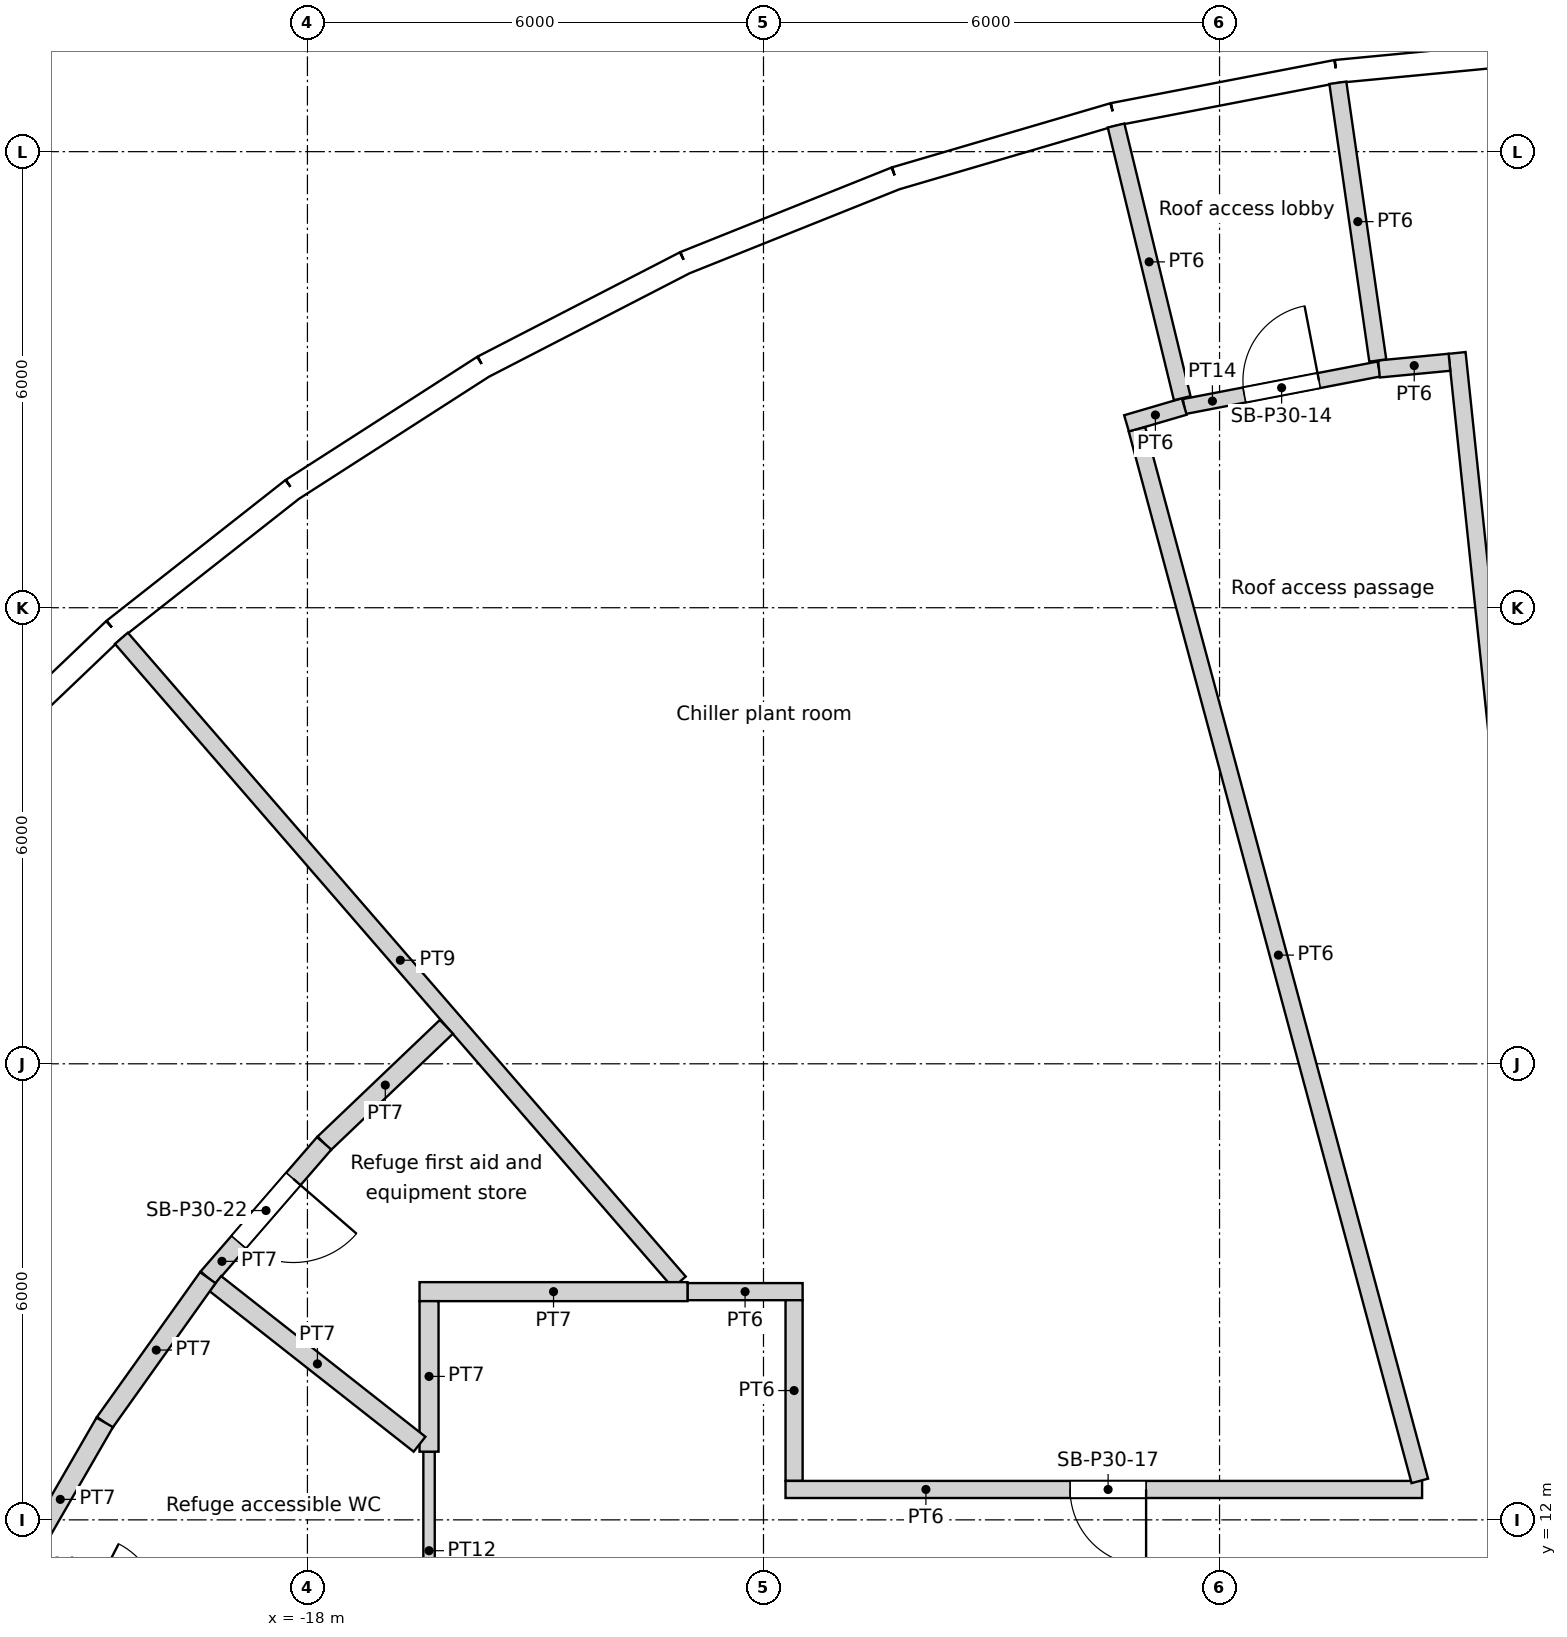
"""IFC4 building model, lengths in metres.
Left out: names, types, materials, properties, quantities, classifications, styles, units other than length and angle.
Written with IfcOpenShell. Run it as: python <this file> out.ifc"""

import sys

from ifc_helpers import new_model, si_unit, direction, frame, frame_2d, origin, origin_2d, place, context, subcontext, project, spatial, rectangle, circle, extrude, element, fill, save


model = new_model("IFC4")
c1 = context("Model", 3, precision=1e-05, world=origin(), true_north=direction((0.0, 1.0)))
c2 = subcontext(c1, "Body", "Model", "MODEL_VIEW")
j1 = project(units=[si_unit("LENGTHUNIT", "METRE"), si_unit("PLANEANGLEUNIT", "RADIAN")], contexts=[c1])
p1 = place(None, origin())
s1 = spatial("IfcSite", under=j1, at=p1, CompositionType="ELEMENT")
p2 = place(p1, origin())
s2 = spatial("IfcBuilding", under=s1, at=p2, CompositionType="ELEMENT")
p3 = place(p2, frame((0.0, 0.0, 120.0)))
s3 = spatial("IfcBuildingStorey", under=s2, at=p3, CompositionType="ELEMENT", Elevation=120.0)
for number, where, z_axis, x_axis in (
    (1, (-4.309, 29.966, 0.0), (0.0, 0.0, 1.0), (1.0, 0.0, 0.0)),
    (2, (-9.902, 28.61, 0.0), (0.0, 0.0, 1.0), (1.0, 0.0, 0.0)),
    (3, (-15.137, 26.219, 0.0), (0.0, 0.0, 1.0), (1.0, 0.0, 0.0)),
    (4, (-19.826, 22.88, 0.0), (0.0, 0.0, 1.0), (1.0, 0.0, 0.0)),
):
    element("IfcColumn", number, at=place(p3, frame(where, z_axis=z_axis, x_axis=x_axis)), inside=s3, PredefinedType="COLUMN", context=c2, shape_type="SweptSolid", body=[
        extrude(circle(Radius=0.6, at=origin_2d()), origin(), (0.0, 0.0, 1.0), 6.0),
    ])
for number, where, z_axis, x_axis in (
    (5, (-7.04, 23.516, 0.0), (0.0, 0.0, 1.0), (1.0, 0.0, 0.0)),
    (6, (-12.274, 21.259, 0.0), (0.0, 0.0, 1.0), (1.0, 0.0, 0.0)),
    (7, (-16.846, 17.855, 0.0), (0.0, 0.0, 1.0), (1.0, 0.0, 0.0)),
    (8, (-20.509, 13.489, 0.0), (0.0, 0.0, 1.0), (1.0, 0.0, 0.0)),
):
    element("IfcColumn", number, at=place(p3, frame(where, z_axis=z_axis, x_axis=x_axis)), inside=s3, PredefinedType="COLUMN", context=c2, shape_type="SweptSolid", body=[
        extrude(circle(Radius=0.65, at=origin_2d()), origin(), (0.0, 0.0, 1.0), 6.0),
    ])
for number, where, z_axis, x_axis in (
    (9, (-4.188, 18.35, 0.0), (0.0, 0.0, 1.0), (1.0, 0.0, 0.0)),
    (10, (-9.411, 16.301, 0.0), (0.0, 0.0, 1.0), (1.0, 0.0, 0.0)),
    (11, (-13.798, 12.802, 0.0), (0.0, 0.0, 1.0), (1.0, 0.0, 0.0)),
):
    element("IfcColumn", number, at=place(p3, frame(where, z_axis=z_axis, x_axis=x_axis)), inside=s3, PredefinedType="COLUMN", context=c2, shape_type="SweptSolid", body=[
        extrude(circle(Radius=0.7, at=origin_2d()), origin(), (0.0, 0.0, 1.0), 6.0),
    ])
p4 = place(p3, frame((-1.493, 31.339, 0.0), z_axis=(0.0, 0.0, 1.0), x_axis=(-0.99547560533, -0.095017467833, 0.0)))
e12 = element("IfcWall", 12, at=p4, inside=s3, PredefinedType="SOLIDWALL", context=c2, shape_type="SweptSolid", body=[
    extrude(rectangle(XDim=2.986, YDim=0.3, at=frame_2d((1.493, 0.0))), origin(), (0.0, 0.0, 1.0), 5.7),
])
p5 = place(p4, frame((1.493, 0.0, 1.8)))
e13 = element("IfcOpeningElement", 13, at=p5, cuts=e12, PredefinedType="OPENING", context=c2, shape_type="SweptSolid", body=[
    extrude(circle(Radius=1.2, at=origin_2d()), frame((0.0, 0.16, 0.0), z_axis=(0.0, -1.0, 0.0), x_axis=(1.0, 0.0, 0.0)), (0.0, 0.0, 1.0), 0.32),
])
p6 = place(p3, frame((-4.465, 31.055, 0.0), z_axis=(0.0, 0.0, 1.0), x_axis=(-0.981918853666, -0.189302310646, 0.0)))
e14 = element("IfcWall", 14, at=p6, inside=s3, PredefinedType="SOLIDWALL", context=c2, shape_type="SweptSolid", body=[
    extrude(rectangle(XDim=2.986, YDim=0.3, at=frame_2d((1.493, 0.0))), origin(), (0.0, 0.0, 1.0), 5.7),
])
p7 = place(p6, frame((1.493, 0.0, 1.8)))
e15 = element("IfcOpeningElement", 15, at=p7, cuts=e14, PredefinedType="OPENING", context=c2, shape_type="SweptSolid", body=[
    extrude(circle(Radius=1.2, at=origin_2d()), frame((0.0, 0.16, 0.0), z_axis=(0.0, -1.0, 0.0), x_axis=(1.0, 0.0, 0.0)), (0.0, 0.0, 1.0), 0.32),
])
p8 = place(p3, frame((-7.397, 30.49, 0.0), z_axis=(0.0, 0.0, 1.0), x_axis=(-0.959502108153, -0.281701445593, 0.0)))
e16 = element("IfcWall", 16, at=p8, inside=s3, PredefinedType="SOLIDWALL", context=c2, shape_type="SweptSolid", body=[
    extrude(rectangle(XDim=2.986, YDim=0.3, at=frame_2d((1.493, 0.0))), origin(), (0.0, 0.0, 1.0), 5.7),
])
p9 = place(p8, frame((1.493, 0.0, 1.8)))
e17 = element("IfcOpeningElement", 17, at=p9, cuts=e16, PredefinedType="OPENING", context=c2, shape_type="SweptSolid", body=[
    extrude(circle(Radius=1.2, at=origin_2d()), frame((0.0, 0.16, 0.0), z_axis=(0.0, -1.0, 0.0), x_axis=(1.0, 0.0, 0.0)), (0.0, 0.0, 1.0), 0.32),
])
p10 = place(p3, frame((-10.261, 29.649, 0.0), z_axis=(0.0, 0.0, 1.0), x_axis=(-0.928380795373, -0.371630325434, 0.0)))
e18 = element("IfcWall", 18, at=p10, inside=s3, PredefinedType="SOLIDWALL", context=c2, shape_type="SweptSolid", body=[
    extrude(rectangle(XDim=2.986, YDim=0.3, at=frame_2d((1.493, 0.0))), origin(), (0.0, 0.0, 1.0), 5.7),
])
p11 = place(p10, frame((1.493, 0.0, 1.8)))
e19 = element("IfcOpeningElement", 19, at=p11, cuts=e18, PredefinedType="OPENING", context=c2, shape_type="SweptSolid", body=[
    extrude(circle(Radius=1.2, at=origin_2d()), frame((0.0, 0.16, 0.0), z_axis=(0.0, -1.0, 0.0), x_axis=(1.0, 0.0, 0.0)), (0.0, 0.0, 1.0), 0.32),
])
p12 = place(p3, frame((-13.033, 28.539, 0.0), z_axis=(0.0, 0.0, 1.0), x_axis=(-0.888831268481, -0.458234630043, 0.0)))
e20 = element("IfcWall", 20, at=p12, inside=s3, PredefinedType="SOLIDWALL", context=c2, shape_type="SweptSolid", body=[
    extrude(rectangle(XDim=2.986, YDim=0.3, at=frame_2d((1.493, 0.0))), origin(), (0.0, 0.0, 1.0), 5.7),
])
p13 = place(p12, frame((1.493, 0.0, 1.8)))
e21 = element("IfcOpeningElement", 21, at=p13, cuts=e20, PredefinedType="OPENING", context=c2, shape_type="SweptSolid", body=[
    extrude(circle(Radius=1.2, at=origin_2d()), frame((0.0, 0.16, 0.0), z_axis=(0.0, -1.0, 0.0), x_axis=(1.0, 0.0, 0.0)), (0.0, 0.0, 1.0), 0.32),
])
p14 = place(p3, frame((-15.687, 27.171, 0.0), z_axis=(0.0, 0.0, 1.0), x_axis=(-0.841242231846, -0.540658401727, 0.0)))
e22 = element("IfcWall", 22, at=p14, inside=s3, PredefinedType="SOLIDWALL", context=c2, shape_type="SweptSolid", body=[
    extrude(rectangle(XDim=2.986, YDim=0.3, at=frame_2d((1.493, 0.0))), origin(), (0.0, 0.0, 1.0), 5.7),
])
p15 = place(p14, frame((1.493, 0.0, 1.8)))
e23 = element("IfcOpeningElement", 23, at=p15, cuts=e22, PredefinedType="OPENING", context=c2, shape_type="SweptSolid", body=[
    extrude(circle(Radius=1.2, at=origin_2d()), frame((0.0, 0.16, 0.0), z_axis=(0.0, -1.0, 0.0), x_axis=(1.0, 0.0, 0.0)), (0.0, 0.0, 1.0), 0.32),
])
p16 = place(p3, frame((-18.199, 25.557, 0.0), z_axis=(0.0, 0.0, 1.0), x_axis=(-0.786043032847, -0.618171780747, 0.0)))
e24 = element("IfcWall", 24, at=p16, inside=s3, PredefinedType="SOLIDWALL", context=c2, shape_type="SweptSolid", body=[
    extrude(rectangle(XDim=2.986, YDim=0.3, at=frame_2d((1.493, 0.0))), origin(), (0.0, 0.0, 1.0), 5.7),
])
p17 = place(p16, frame((1.493, 0.0, 1.8)))
e25 = element("IfcOpeningElement", 25, at=p17, cuts=e24, PredefinedType="OPENING", context=c2, shape_type="SweptSolid", body=[
    extrude(circle(Radius=1.2, at=origin_2d()), frame((0.0, 0.16, 0.0), z_axis=(0.0, -1.0, 0.0), x_axis=(1.0, 0.0, 0.0)), (0.0, 0.0, 1.0), 0.32),
])
p18 = place(p3, frame((-20.546, 23.711, 0.0), z_axis=(0.0, 0.0, 1.0), x_axis=(-0.723750841228, -0.690061388444, 0.0)))
e26 = element("IfcWall", 26, at=p18, inside=s3, PredefinedType="SOLIDWALL", context=c2, shape_type="SweptSolid", body=[
    extrude(rectangle(XDim=2.986, YDim=0.3, at=frame_2d((1.493, 0.0))), origin(), (0.0, 0.0, 1.0), 5.7),
])
p19 = place(p18, frame((1.493, 0.0, 1.8)))
e27 = element("IfcOpeningElement", 27, at=p19, cuts=e26, PredefinedType="OPENING", context=c2, shape_type="SweptSolid", body=[
    extrude(circle(Radius=1.2, at=origin_2d()), frame((0.0, 0.16, 0.0), z_axis=(0.0, -1.0, 0.0), x_axis=(1.0, 0.0, 0.0)), (0.0, 0.0, 1.0), 0.32),
])
p20 = place(p3, frame((-20.667, 13.282, 0.0), z_axis=(0.0, 0.0, 1.0), x_axis=(-0.500002679963, -0.866023856502, 0.0)))
e28 = element("IfcWall", 28, at=p20, inside=s3, PredefinedType="PARTITIONING", context=c2, shape_type="SweptSolid", body=[
    extrude(rectangle(XDim=2.338, YDim=0.25, at=frame_2d((1.169, 0.0))), origin(), (0.0, 0.0, 1.0), 5.2),
])
p21 = place(p3, frame((-20.448, 23.598, 0.0), z_axis=(0.0, 0.0, 1.0), x_axis=(0.654866679399, -0.755744422548, 0.0)))
e29 = element("IfcWall", 29, at=p21, inside=s3, PredefinedType="PARTITIONING", context=c2, shape_type="SweptSolid", body=[
    extrude(rectangle(XDim=11.208, YDim=0.225, at=frame_2d((5.604, 0.0))), origin(), (0.0, 0.0, 1.0), 2.7),
])
p22 = place(p3, frame((-19.311, 15.186, 0.0), z_axis=(0.0, 0.0, 1.0), x_axis=(-0.580032319147, -0.814593462252, 0.0)))
e30 = element("IfcWall", 30, at=p22, inside=s3, PredefinedType="PARTITIONING", context=c2, shape_type="SweptSolid", body=[
    extrude(rectangle(XDim=2.338, YDim=0.25, at=frame_2d((1.169, 0.0))), origin(), (0.0, 0.0, 1.0), 5.2),
])
p23 = place(p3, frame((-19.212, 15.109, 0.0), z_axis=(0.0, 0.0, 1.0), x_axis=(0.786080397648, -0.618124266174, 0.0)))
e31 = element("IfcWall", 31, at=p23, inside=s3, PredefinedType="PARTITIONING", context=c2, shape_type="SweptSolid", body=[
    extrude(rectangle(XDim=3.419, YDim=0.25, at=frame_2d((1.709, 0.0))), origin(), (0.0, 0.0, 1.0), 5.2),
])
p24 = place(p3, frame((-17.78, 16.953, 0.0), z_axis=(0.0, 0.0, 1.0), x_axis=(-0.654866925236, -0.755744209526, 0.0)))
e32 = element("IfcWall", 32, at=p24, inside=s3, PredefinedType="PARTITIONING", context=c2, shape_type="SweptSolid", body=[
    extrude(rectangle(XDim=2.338, YDim=0.25, at=frame_2d((1.169, 0.0))), origin(), (0.0, 0.0, 1.0), 5.2),
])
p25 = place(p24, frame((0.619, 0.0, 0.0)))
e33 = element("IfcOpeningElement", 33, at=p25, cuts=e32, PredefinedType="OPENING", context=c2, shape_type="SweptSolid", body=[
    extrude(rectangle(XDim=1.1, YDim=2.1, at=frame_2d((0.55, 1.05))), frame((0.0, 0.125, 0.0), z_axis=(0.0, -1.0, 0.0), x_axis=(1.0, 0.0, 0.0)), (0.0, 0.0, 1.0), 0.25),
])
p26 = place(p3, frame((-16.4, 12.897, 0.0), z_axis=(0.0, 0.0, 1.0), x_axis=(0.0, -1.0, 0.0)))
e34 = element("IfcWall", 34, at=p26, inside=s3, PredefinedType="PARTITIONING", context=c2, shape_type="SweptSolid", body=[
    extrude(rectangle(XDim=2.606, YDim=0.15, at=frame_2d((1.303, 0.0))), origin(), (0.0, 0.0, 1.0), 5.2),
])
p27 = place(p3, frame((-16.4, 14.877, 0.0), z_axis=(0.0, 0.0, 1.0), x_axis=(0.0, -1.0, 0.0)))
e35 = element("IfcWall", 35, at=p27, inside=s3, PredefinedType="PARTITIONING", context=c2, shape_type="SweptSolid", body=[
    extrude(rectangle(XDim=1.98, YDim=0.25, at=frame_2d((0.99, 0.0))), origin(), (0.0, 0.0, 1.0), 5.2),
])
p28 = place(p3, frame((-16.171, 18.487, 0.0), z_axis=(0.0, 0.0, 1.0), x_axis=(-0.723714578036, -0.690099420039, 0.0)))
e36 = element("IfcWall", 36, at=p28, inside=s3, PredefinedType="PARTITIONING", context=c2, shape_type="SweptSolid", body=[
    extrude(rectangle(XDim=2.222, YDim=0.25, at=frame_2d((1.111, 0.0))), origin(), (0.0, 0.0, 1.0), 5.2),
])
p29 = place(p3, frame((-13.0, 15.002, 0.0), z_axis=(0.0, 0.0, 1.0), x_axis=(-1.0, 0.0, 0.0)))
e37 = element("IfcWall", 37, at=p29, inside=s3, PredefinedType="PARTITIONING", context=c2, shape_type="SweptSolid", body=[
    extrude(rectangle(XDim=3.525, YDim=0.25, at=frame_2d((1.763, 0.0))), origin(), (0.0, 0.0, 1.0), 5.2),
])
p30 = place(p3, frame((-11.598, 12.512, 0.0), z_axis=(0.0, 0.0, 1.0), x_axis=(0.0, 1.0, 0.0)))
e38 = element("IfcWall", 38, at=p30, inside=s3, PredefinedType="PARTITIONING", context=c2, shape_type="SweptSolid", body=[
    extrude(rectangle(XDim=2.377, YDim=0.225, at=frame_2d((1.189, 0.0))), origin(), (0.0, 0.0, 1.0), 5.2),
])
p31 = place(p3, frame((-11.485, 15.002, 0.0), z_axis=(0.0, 0.0, 1.0), x_axis=(-1.0, 0.0, 0.0)))
e39 = element("IfcWall", 39, at=p31, inside=s3, PredefinedType="PARTITIONING", context=c2, shape_type="SweptSolid", body=[
    extrude(rectangle(XDim=1.515, YDim=0.225, at=frame_2d((0.757, 0.0))), origin(), (0.0, 0.0, 1.0), 5.2),
])
p32 = place(p3, frame((-7.361, 30.344, 0.0), z_axis=(0.0, 0.0, 1.0), x_axis=(0.235713599034, -0.971822565714, 0.0)))
e40 = element("IfcWall", 40, at=p32, inside=s3, PredefinedType="PARTITIONING", context=c2, shape_type="SweptSolid", body=[
    extrude(rectangle(XDim=3.691, YDim=0.225, at=frame_2d((1.846, 0.0))), origin(), (0.0, 0.0, 1.0), 5.2),
])
p33 = place(p3, frame((-7.086, 26.347, 0.0), z_axis=(0.0, 0.0, 1.0), x_axis=(0.259707010598, -0.965687459091, 0.0)))
e41 = element("IfcWall", 41, at=p33, inside=s3, PredefinedType="PARTITIONING", context=c2, shape_type="SweptSolid", body=[
    extrude(rectangle(XDim=14.327, YDim=0.225, at=frame_2d((7.163, 0.0))), origin(), (0.0, 0.0, 1.0), 5.2),
])
p34 = place(p3, frame((-6.465, 26.647, 0.0), z_axis=(0.0, 0.0, 1.0), x_axis=(-0.959542293585, -0.281564534025, 0.0)))
e42 = element("IfcWall", 42, at=p34, inside=s3, PredefinedType="PARTITIONING", context=c2, shape_type="SweptSolid", body=[
    extrude(rectangle(XDim=0.791, YDim=0.225, at=frame_2d((0.396, 0.0))), origin(), (0.0, 0.0, 1.0), 5.2),
])
p35 = place(p3, frame((-4.444, 30.906, 0.0), z_axis=(0.0, 0.0, 1.0), x_axis=(0.142319391599, -0.989820787201, 0.0)))
e43 = element("IfcWall", 43, at=p35, inside=s3, PredefinedType="PARTITIONING", context=c2, shape_type="SweptSolid", body=[
    extrude(rectangle(XDim=3.692, YDim=0.225, at=frame_2d((1.846, 0.0))), origin(), (0.0, 0.0, 1.0), 5.2),
])
p36 = place(p3, frame((-6.465, 26.647, 0.0), z_axis=(0.0, 0.0, 1.0), x_axis=(0.981924271327, 0.18927420685, 0.0)))
e44 = element("IfcWall", 44, at=p36, inside=s3, PredefinedType="PARTITIONING", context=c2, shape_type="SweptSolid", body=[
    extrude(rectangle(XDim=2.609, YDim=0.2, at=frame_2d((1.305, 0.0))), origin(), (0.0, 0.0, 1.0), 5.2),
])
p37 = place(p36, frame((0.805, 0.0, 0.0)))
e45 = element("IfcOpeningElement", 45, at=p37, cuts=e44, PredefinedType="OPENING", context=c2, shape_type="SweptSolid", body=[
    extrude(rectangle(XDim=1.0, YDim=2.1, at=frame_2d((0.5, 1.05))), frame((0.0, 0.1, 0.0), z_axis=(0.0, -1.0, 0.0), x_axis=(1.0, 0.0, 0.0)), (0.0, 0.0, 1.0), 0.2),
])
p38 = place(p3, frame((-3.335, 12.4, 0.0), z_axis=(0.0, 0.0, 1.0), x_axis=(-1.0, 0.0, 0.0)))
e46 = element("IfcWall", 46, at=p38, inside=s3, PredefinedType="PARTITIONING", context=c2, shape_type="SweptSolid", body=[
    extrude(rectangle(XDim=8.375, YDim=0.225, at=frame_2d((4.188, 0.0))), origin(), (0.0, 0.0, 1.0), 5.2),
])
p39 = place(p38, frame((3.631, 0.0, 0.0)))
e47 = element("IfcOpeningElement", 47, at=p39, cuts=e46, PredefinedType="OPENING", context=c2, shape_type="SweptSolid", body=[
    extrude(rectangle(XDim=1.0, YDim=2.1, at=frame_2d((0.5, 1.05))), frame((0.0, 0.113, 0.0), z_axis=(0.0, -1.0, 0.0), x_axis=(1.0, 0.0, 0.0)), (0.0, 0.0, 1.0), 0.225),
])
p40 = place(p3, frame((-2.975, 27.229, 0.0), z_axis=(0.0, 0.0, 1.0), x_axis=(-0.995461237405, -0.095167877055, 0.0)))
e48 = element("IfcWall", 48, at=p40, inside=s3, PredefinedType="PARTITIONING", context=c2, shape_type="SweptSolid", body=[
    extrude(rectangle(XDim=0.931, YDim=0.225, at=frame_2d((0.466, 0.0))), origin(), (0.0, 0.0, 1.0), 5.2),
])
p41 = place(p3, frame((-2.875, 27.352, 0.0), z_axis=(0.0, 0.0, 1.0), x_axis=(0.104532331853, -0.994521488756, 0.0)))
e49 = element("IfcWall", 49, at=p41, inside=s3, PredefinedType="PARTITIONING", context=c2, shape_type="SweptSolid", body=[
    extrude(rectangle(XDim=14.922, YDim=0.225, at=frame_2d((7.461, 0.0))), origin(), (0.0, 0.0, 1.0), 5.2),
])
p42 = place(p5, origin())
e50 = element("IfcWindow", 50, at=p42, inside=s3, PartitioningType="SINGLE_PANEL", PredefinedType="WINDOW", context=c2, shape_type="SweptSolid", body=[
    extrude(circle(Radius=1.2, at=origin_2d()), frame((0.0, 0.12, 0.0), z_axis=(0.0, -1.0, 0.0), x_axis=(1.0, 0.0, 0.0)), (0.0, 0.0, 1.0), 0.1),
])
fill(e13, e50)
p43 = place(p7, origin())
e51 = element("IfcWindow", 51, at=p43, inside=s3, PartitioningType="SINGLE_PANEL", PredefinedType="WINDOW", context=c2, shape_type="SweptSolid", body=[
    extrude(circle(Radius=1.2, at=origin_2d()), frame((0.0, 0.12, 0.0), z_axis=(0.0, -1.0, 0.0), x_axis=(1.0, 0.0, 0.0)), (0.0, 0.0, 1.0), 0.1),
])
fill(e15, e51)
p44 = place(p9, origin())
e52 = element("IfcWindow", 52, at=p44, inside=s3, PartitioningType="SINGLE_PANEL", PredefinedType="WINDOW", context=c2, shape_type="SweptSolid", body=[
    extrude(circle(Radius=1.2, at=origin_2d()), frame((0.0, 0.12, 0.0), z_axis=(0.0, -1.0, 0.0), x_axis=(1.0, 0.0, 0.0)), (0.0, 0.0, 1.0), 0.1),
])
fill(e17, e52)
p45 = place(p11, origin())
e53 = element("IfcWindow", 53, at=p45, inside=s3, PartitioningType="SINGLE_PANEL", PredefinedType="WINDOW", context=c2, shape_type="SweptSolid", body=[
    extrude(circle(Radius=1.2, at=origin_2d()), frame((0.0, 0.12, 0.0), z_axis=(0.0, -1.0, 0.0), x_axis=(1.0, 0.0, 0.0)), (0.0, 0.0, 1.0), 0.1),
])
fill(e19, e53)
p46 = place(p13, origin())
e54 = element("IfcWindow", 54, at=p46, inside=s3, PartitioningType="SINGLE_PANEL", PredefinedType="WINDOW", context=c2, shape_type="SweptSolid", body=[
    extrude(circle(Radius=1.2, at=origin_2d()), frame((0.0, 0.12, 0.0), z_axis=(0.0, -1.0, 0.0), x_axis=(1.0, 0.0, 0.0)), (0.0, 0.0, 1.0), 0.1),
])
fill(e21, e54)
p47 = place(p15, origin())
e55 = element("IfcWindow", 55, at=p47, inside=s3, PartitioningType="SINGLE_PANEL", PredefinedType="WINDOW", context=c2, shape_type="SweptSolid", body=[
    extrude(circle(Radius=1.2, at=origin_2d()), frame((0.0, 0.12, 0.0), z_axis=(0.0, -1.0, 0.0), x_axis=(1.0, 0.0, 0.0)), (0.0, 0.0, 1.0), 0.1),
])
fill(e23, e55)
p48 = place(p17, origin())
e56 = element("IfcWindow", 56, at=p48, inside=s3, PartitioningType="SINGLE_PANEL", PredefinedType="WINDOW", context=c2, shape_type="SweptSolid", body=[
    extrude(circle(Radius=1.2, at=origin_2d()), frame((0.0, 0.12, 0.0), z_axis=(0.0, -1.0, 0.0), x_axis=(1.0, 0.0, 0.0)), (0.0, 0.0, 1.0), 0.1),
])
fill(e25, e56)
p49 = place(p19, origin())
e57 = element("IfcWindow", 57, at=p49, inside=s3, PartitioningType="SINGLE_PANEL", PredefinedType="WINDOW", context=c2, shape_type="SweptSolid", body=[
    extrude(circle(Radius=1.2, at=origin_2d()), frame((0.0, 0.12, 0.0), z_axis=(0.0, -1.0, 0.0), x_axis=(1.0, 0.0, 0.0)), (0.0, 0.0, 1.0), 0.1),
])
fill(e27, e57)
p50 = place(p37, origin())
e58 = element("IfcDoor", 58, at=p50, inside=s3, OperationType="SINGLE_SWING_RIGHT", PredefinedType="DOOR", context=c2, shape_type="SweptSolid", body=[
    extrude(rectangle(XDim=1.0, YDim=2.1, at=frame_2d((0.5, 1.05))), frame((0.0, 0.025, 0.0), z_axis=(0.0, -1.0, 0.0), x_axis=(1.0, 0.0, 0.0)), (0.0, 0.0, 1.0), 0.05),
])
fill(e45, e58)
p51 = place(p39, origin())
e59 = element("IfcDoor", 59, at=p51, inside=s3, OperationType="SINGLE_SWING_LEFT", PredefinedType="DOOR", context=c2, shape_type="SweptSolid", body=[
    extrude(rectangle(XDim=1.0, YDim=2.1, at=frame_2d((0.5, 1.05))), frame((0.0, 0.025, 0.0), z_axis=(0.0, -1.0, 0.0), x_axis=(1.0, 0.0, 0.0)), (0.0, 0.0, 1.0), 0.05),
])
fill(e47, e59)
p52 = place(p25, origin())
e60 = element("IfcDoor", 60, at=p52, inside=s3, OperationType="SINGLE_SWING_LEFT", PredefinedType="DOOR", context=c2, shape_type="SweptSolid", body=[
    extrude(rectangle(XDim=1.1, YDim=2.1, at=frame_2d((0.55, 1.05))), frame((0.0, 0.025, 0.0), z_axis=(0.0, -1.0, 0.0), x_axis=(1.0, 0.0, 0.0)), (0.0, 0.0, 1.0), 0.05),
])
fill(e33, e60)
save(model, sys.argv[1])
